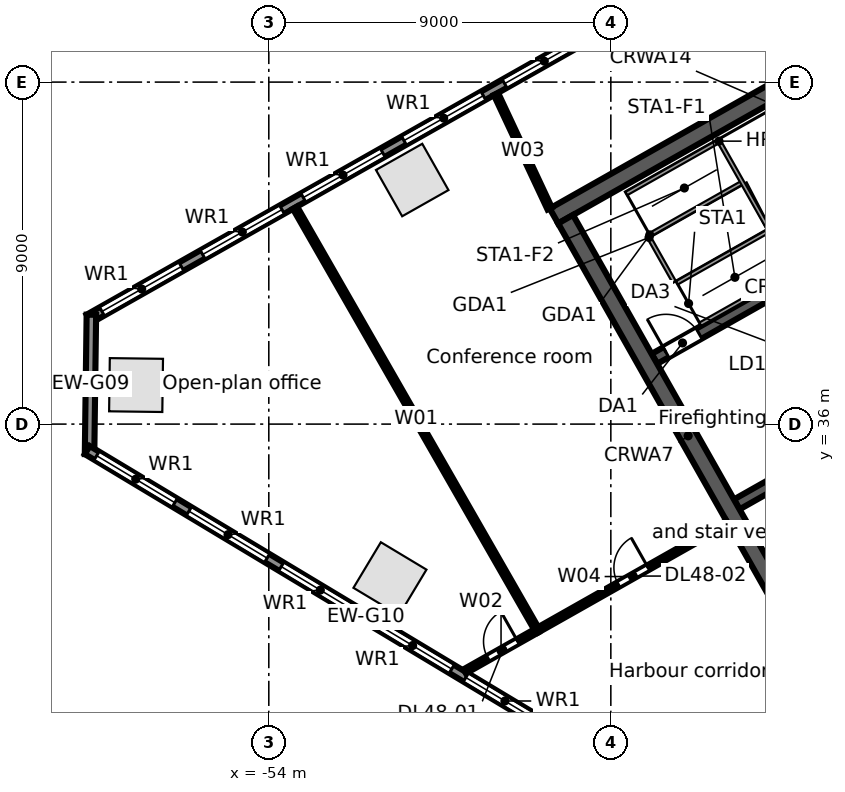
"""IFC4 building model, lengths in metres.
Left out: names, types, materials, properties, quantities, classifications, styles, units other than length and angle.
Written with IfcOpenShell. Run it as: python <this file> out.ifc"""

import sys

from ifc_helpers import new_model, si_unit, direction, frame, frame_2d, origin, origin_2d, place, context, subcontext, project, spatial, rectangle, extrude, element, fill, save


model = new_model("IFC4")
c1 = context("Model", 3, precision=1e-05, world=origin(), true_north=direction((0.0, 1.0)))
c2 = subcontext(c1, "Body", "Model", "MODEL_VIEW")
j1 = project(units=[si_unit("LENGTHUNIT", "METRE"), si_unit("PLANEANGLEUNIT", "RADIAN")], contexts=[c1])
p1 = place(None, origin())
s1 = spatial("IfcSite", under=j1, at=p1, CompositionType="ELEMENT")
p2 = place(p1, origin())
s2 = spatial("IfcBuilding", under=s1, at=p2, CompositionType="ELEMENT")
p3 = place(p2, frame((0.0, 0.0, 219.2)))
s3 = spatial("IfcBuildingStorey", under=s2, at=p3, CompositionType="ELEMENT", Elevation=219.2)
for number, where, z_axis, x_axis in (
    (1, (-50.226, 42.423, 0.0), (0.0, 0.0, 1.0), (-0.87, -0.492, 0.0)),
    (2, (-57.493, 37.027, 0.0), (0.0, 0.0, 1.0), (-0.013, -1.0, 0.0)),
    (3, (-50.812, 31.931, 0.0), (0.0, 0.0, 1.0), (0.857, -0.515, 0.0)),
):
    element("IfcColumn", number, at=place(p3, frame(where, z_axis=z_axis, x_axis=x_axis)), inside=s3, PredefinedType="COLUMN", context=c2, shape_type="SweptSolid", body=[
        extrude(rectangle(XDim=1.4, YDim=1.4, at=origin_2d()), origin(), (0.0, 0.0, 1.0), 3.9),
    ])
p4 = place(p3, frame((-58.732, 38.771, 0.0), z_axis=(0.0, 0.0, 1.0), x_axis=(0.870354824205, 0.492425100887, 0.0)))
e4 = element("IfcWall", 4, at=p4, inside=s3, PredefinedType="STANDARD", context=c2, shape_type="SweptSolid", body=[
    extrude(rectangle(XDim=64.006, YDim=0.25, at=frame_2d((32.003, 0.0))), origin(), (0.0, 0.0, 1.0), 3.62),
])
p5 = place(p4, frame((61.259, 0.0, 0.8)))
e5 = element("IfcOpeningElement", 5, at=p5, cuts=e4, PredefinedType="OPENING", context=c2, shape_type="SweptSolid", body=[
    extrude(rectangle(XDim=2.4, YDim=2.2, at=frame_2d((1.2, 1.1))), frame((0.0, 0.135, 0.0), z_axis=(0.0, -1.0, 0.0), x_axis=(1.0, 0.0, 0.0)), (0.0, 0.0, 1.0), 0.27),
])
p6 = place(p4, frame((58.216, 0.0, 0.8)))
e6 = element("IfcOpeningElement", 6, at=p6, cuts=e4, PredefinedType="OPENING", context=c2, shape_type="SweptSolid", body=[
    extrude(rectangle(XDim=2.4, YDim=2.2, at=frame_2d((1.2, 1.1))), frame((0.0, 0.135, 0.0), z_axis=(0.0, -1.0, 0.0), x_axis=(1.0, 0.0, 0.0)), (0.0, 0.0, 1.0), 0.27),
])
p7 = place(p4, frame((55.173, 0.0, 0.8)))
e7 = element("IfcOpeningElement", 7, at=p7, cuts=e4, PredefinedType="OPENING", context=c2, shape_type="SweptSolid", body=[
    extrude(rectangle(XDim=2.4, YDim=2.2, at=frame_2d((1.2, 1.1))), frame((0.0, 0.135, 0.0), z_axis=(0.0, -1.0, 0.0), x_axis=(1.0, 0.0, 0.0)), (0.0, 0.0, 1.0), 0.27),
])
p8 = place(p4, frame((52.129, 0.0, 0.8)))
e8 = element("IfcOpeningElement", 8, at=p8, cuts=e4, PredefinedType="OPENING", context=c2, shape_type="SweptSolid", body=[
    extrude(rectangle(XDim=2.4, YDim=2.2, at=frame_2d((1.2, 1.1))), frame((0.0, 0.135, 0.0), z_axis=(0.0, -1.0, 0.0), x_axis=(1.0, 0.0, 0.0)), (0.0, 0.0, 1.0), 0.27),
])
p9 = place(p4, frame((49.086, 0.0, 0.8)))
e9 = element("IfcOpeningElement", 9, at=p9, cuts=e4, PredefinedType="OPENING", context=c2, shape_type="SweptSolid", body=[
    extrude(rectangle(XDim=2.4, YDim=2.2, at=frame_2d((1.2, 1.1))), frame((0.0, 0.135, 0.0), z_axis=(0.0, -1.0, 0.0), x_axis=(1.0, 0.0, 0.0)), (0.0, 0.0, 1.0), 0.27),
])
p10 = place(p4, frame((46.043, 0.0, 0.8)))
e10 = element("IfcOpeningElement", 10, at=p10, cuts=e4, PredefinedType="OPENING", context=c2, shape_type="SweptSolid", body=[
    extrude(rectangle(XDim=2.4, YDim=2.2, at=frame_2d((1.2, 1.1))), frame((0.0, 0.135, 0.0), z_axis=(0.0, -1.0, 0.0), x_axis=(1.0, 0.0, 0.0)), (0.0, 0.0, 1.0), 0.27),
])
p11 = place(p4, frame((43.0, 0.0, 0.8)))
e11 = element("IfcOpeningElement", 11, at=p11, cuts=e4, PredefinedType="OPENING", context=c2, shape_type="SweptSolid", body=[
    extrude(rectangle(XDim=2.4, YDim=2.2, at=frame_2d((1.2, 1.1))), frame((0.0, 0.135, 0.0), z_axis=(0.0, -1.0, 0.0), x_axis=(1.0, 0.0, 0.0)), (0.0, 0.0, 1.0), 0.27),
])
p12 = place(p4, frame((39.956, 0.0, 0.8)))
e12 = element("IfcOpeningElement", 12, at=p12, cuts=e4, PredefinedType="OPENING", context=c2, shape_type="SweptSolid", body=[
    extrude(rectangle(XDim=2.4, YDim=2.2, at=frame_2d((1.2, 1.1))), frame((0.0, 0.135, 0.0), z_axis=(0.0, -1.0, 0.0), x_axis=(1.0, 0.0, 0.0)), (0.0, 0.0, 1.0), 0.27),
])
p13 = place(p4, frame((36.913, 0.0, 0.8)))
e13 = element("IfcOpeningElement", 13, at=p13, cuts=e4, PredefinedType="OPENING", context=c2, shape_type="SweptSolid", body=[
    extrude(rectangle(XDim=2.4, YDim=2.2, at=frame_2d((1.2, 1.1))), frame((0.0, 0.135, 0.0), z_axis=(0.0, -1.0, 0.0), x_axis=(1.0, 0.0, 0.0)), (0.0, 0.0, 1.0), 0.27),
])
p14 = place(p4, frame((33.87, 0.0, 0.8)))
e14 = element("IfcOpeningElement", 14, at=p14, cuts=e4, PredefinedType="OPENING", context=c2, shape_type="SweptSolid", body=[
    extrude(rectangle(XDim=2.4, YDim=2.2, at=frame_2d((1.2, 1.1))), frame((0.0, 0.135, 0.0), z_axis=(0.0, -1.0, 0.0), x_axis=(1.0, 0.0, 0.0)), (0.0, 0.0, 1.0), 0.27),
])
p15 = place(p4, frame((30.826, 0.0, 0.8)))
e15 = element("IfcOpeningElement", 15, at=p15, cuts=e4, PredefinedType="OPENING", context=c2, shape_type="SweptSolid", body=[
    extrude(rectangle(XDim=2.4, YDim=2.2, at=frame_2d((1.2, 1.1))), frame((0.0, 0.135, 0.0), z_axis=(0.0, -1.0, 0.0), x_axis=(1.0, 0.0, 0.0)), (0.0, 0.0, 1.0), 0.27),
])
p16 = place(p4, frame((27.783, 0.0, 0.8)))
e16 = element("IfcOpeningElement", 16, at=p16, cuts=e4, PredefinedType="OPENING", context=c2, shape_type="SweptSolid", body=[
    extrude(rectangle(XDim=2.4, YDim=2.2, at=frame_2d((1.2, 1.1))), frame((0.0, 0.135, 0.0), z_axis=(0.0, -1.0, 0.0), x_axis=(1.0, 0.0, 0.0)), (0.0, 0.0, 1.0), 0.27),
])
p17 = place(p4, frame((24.74, 0.0, 0.8)))
e17 = element("IfcOpeningElement", 17, at=p17, cuts=e4, PredefinedType="OPENING", context=c2, shape_type="SweptSolid", body=[
    extrude(rectangle(XDim=2.4, YDim=2.2, at=frame_2d((1.2, 1.1))), frame((0.0, 0.135, 0.0), z_axis=(0.0, -1.0, 0.0), x_axis=(1.0, 0.0, 0.0)), (0.0, 0.0, 1.0), 0.27),
])
p18 = place(p4, frame((21.696, 0.0, 0.8)))
e18 = element("IfcOpeningElement", 18, at=p18, cuts=e4, PredefinedType="OPENING", context=c2, shape_type="SweptSolid", body=[
    extrude(rectangle(XDim=2.4, YDim=2.2, at=frame_2d((1.2, 1.1))), frame((0.0, 0.135, 0.0), z_axis=(0.0, -1.0, 0.0), x_axis=(1.0, 0.0, 0.0)), (0.0, 0.0, 1.0), 0.27),
])
p19 = place(p4, frame((18.653, 0.0, 0.8)))
e19 = element("IfcOpeningElement", 19, at=p19, cuts=e4, PredefinedType="OPENING", context=c2, shape_type="SweptSolid", body=[
    extrude(rectangle(XDim=2.4, YDim=2.2, at=frame_2d((1.2, 1.1))), frame((0.0, 0.135, 0.0), z_axis=(0.0, -1.0, 0.0), x_axis=(1.0, 0.0, 0.0)), (0.0, 0.0, 1.0), 0.27),
])
p20 = place(p4, frame((15.61, 0.0, 0.8)))
e20 = element("IfcOpeningElement", 20, at=p20, cuts=e4, PredefinedType="OPENING", context=c2, shape_type="SweptSolid", body=[
    extrude(rectangle(XDim=2.4, YDim=2.2, at=frame_2d((1.2, 1.1))), frame((0.0, 0.135, 0.0), z_axis=(0.0, -1.0, 0.0), x_axis=(1.0, 0.0, 0.0)), (0.0, 0.0, 1.0), 0.27),
])
p21 = place(p4, frame((12.567, 0.0, 0.8)))
e21 = element("IfcOpeningElement", 21, at=p21, cuts=e4, PredefinedType="OPENING", context=c2, shape_type="SweptSolid", body=[
    extrude(rectangle(XDim=2.4, YDim=2.2, at=frame_2d((1.2, 1.1))), frame((0.0, 0.135, 0.0), z_axis=(0.0, -1.0, 0.0), x_axis=(1.0, 0.0, 0.0)), (0.0, 0.0, 1.0), 0.27),
])
p22 = place(p4, frame((9.523, 0.0, 0.8)))
e22 = element("IfcOpeningElement", 22, at=p22, cuts=e4, PredefinedType="OPENING", context=c2, shape_type="SweptSolid", body=[
    extrude(rectangle(XDim=2.4, YDim=2.2, at=frame_2d((1.2, 1.1))), frame((0.0, 0.135, 0.0), z_axis=(0.0, -1.0, 0.0), x_axis=(1.0, 0.0, 0.0)), (0.0, 0.0, 1.0), 0.27),
])
p23 = place(p4, frame((6.48, 0.0, 0.8)))
e23 = element("IfcOpeningElement", 23, at=p23, cuts=e4, PredefinedType="OPENING", context=c2, shape_type="SweptSolid", body=[
    extrude(rectangle(XDim=2.4, YDim=2.2, at=frame_2d((1.2, 1.1))), frame((0.0, 0.135, 0.0), z_axis=(0.0, -1.0, 0.0), x_axis=(1.0, 0.0, 0.0)), (0.0, 0.0, 1.0), 0.27),
])
p24 = place(p4, frame((3.437, 0.0, 0.8)))
e24 = element("IfcOpeningElement", 24, at=p24, cuts=e4, PredefinedType="OPENING", context=c2, shape_type="SweptSolid", body=[
    extrude(rectangle(XDim=2.4, YDim=2.2, at=frame_2d((1.2, 1.1))), frame((0.0, 0.135, 0.0), z_axis=(0.0, -1.0, 0.0), x_axis=(1.0, 0.0, 0.0)), (0.0, 0.0, 1.0), 0.27),
])
p25 = place(p4, frame((0.393, 0.0, 0.8)))
e25 = element("IfcOpeningElement", 25, at=p25, cuts=e4, PredefinedType="OPENING", context=c2, shape_type="SweptSolid", body=[
    extrude(rectangle(XDim=2.4, YDim=2.2, at=frame_2d((1.2, 1.1))), frame((0.0, 0.135, 0.0), z_axis=(0.0, -1.0, 0.0), x_axis=(1.0, 0.0, 0.0)), (0.0, 0.0, 1.0), 0.27),
])
p26 = place(p3, frame((-58.717, 35.208, 0.0), z_axis=(0.0, 0.0, 1.0), x_axis=(0.01310512158, 0.999914124207, 0.0)))
e26 = element("IfcWall", 26, at=p26, inside=s3, PredefinedType="STANDARD", context=c2, shape_type="SweptSolid", body=[
    extrude(rectangle(XDim=3.67, YDim=0.25, at=frame_2d((1.835, 0.0))), origin(), (0.0, 0.0, 1.0), 3.62),
])
p27 = place(p3, frame((-44.115, 26.507, 0.0), z_axis=(0.0, 0.0, 1.0), x_axis=(-0.857166583633, 0.515039268311, 0.0)))
e27 = element("IfcWall", 27, at=p27, inside=s3, PredefinedType="STANDARD", context=c2, shape_type="SweptSolid", body=[
    extrude(rectangle(XDim=17.106, YDim=0.25, at=frame_2d((8.553, 0.0))), origin(), (0.0, 0.0, 1.0), 3.62),
])
p28 = place(p27, frame((14.417, 0.0, 0.8)))
e28 = element("IfcOpeningElement", 28, at=p28, cuts=e27, PredefinedType="OPENING", context=c2, shape_type="SweptSolid", body=[
    extrude(rectangle(XDim=2.4, YDim=2.2, at=frame_2d((1.2, 1.1))), frame((0.0, 0.135, 0.0), z_axis=(0.0, -1.0, 0.0), x_axis=(1.0, 0.0, 0.0)), (0.0, 0.0, 1.0), 0.27),
])
p29 = place(p27, frame((11.584, 0.0, 0.8)))
e29 = element("IfcOpeningElement", 29, at=p29, cuts=e27, PredefinedType="OPENING", context=c2, shape_type="SweptSolid", body=[
    extrude(rectangle(XDim=2.4, YDim=2.2, at=frame_2d((1.2, 1.1))), frame((0.0, 0.135, 0.0), z_axis=(0.0, -1.0, 0.0), x_axis=(1.0, 0.0, 0.0)), (0.0, 0.0, 1.0), 0.27),
])
p30 = place(p27, frame((8.75, 0.0, 0.8)))
e30 = element("IfcOpeningElement", 30, at=p30, cuts=e27, PredefinedType="OPENING", context=c2, shape_type="SweptSolid", body=[
    extrude(rectangle(XDim=2.4, YDim=2.2, at=frame_2d((1.2, 1.1))), frame((0.0, 0.135, 0.0), z_axis=(0.0, -1.0, 0.0), x_axis=(1.0, 0.0, 0.0)), (0.0, 0.0, 1.0), 0.27),
])
p31 = place(p27, frame((5.917, 0.0, 0.8)))
e31 = element("IfcOpeningElement", 31, at=p31, cuts=e27, PredefinedType="OPENING", context=c2, shape_type="SweptSolid", body=[
    extrude(rectangle(XDim=2.4, YDim=2.2, at=frame_2d((1.2, 1.1))), frame((0.0, 0.135, 0.0), z_axis=(0.0, -1.0, 0.0), x_axis=(1.0, 0.0, 0.0)), (0.0, 0.0, 1.0), 0.27),
])
p32 = place(p27, frame((3.084, 0.0, 0.8)))
e32 = element("IfcOpeningElement", 32, at=p32, cuts=e27, PredefinedType="OPENING", context=c2, shape_type="SweptSolid", body=[
    extrude(rectangle(XDim=2.4, YDim=2.2, at=frame_2d((1.2, 1.1))), frame((0.0, 0.135, 0.0), z_axis=(0.0, -1.0, 0.0), x_axis=(1.0, 0.0, 0.0)), (0.0, 0.0, 1.0), 0.27),
])
p33 = place(p27, frame((0.25, 0.0, 0.8)))
e33 = element("IfcOpeningElement", 33, at=p33, cuts=e27, PredefinedType="OPENING", context=c2, shape_type="SweptSolid", body=[
    extrude(rectangle(XDim=2.4, YDim=2.2, at=frame_2d((1.2, 1.1))), frame((0.0, 0.135, 0.0), z_axis=(0.0, -1.0, 0.0), x_axis=(1.0, 0.0, 0.0)), (0.0, 0.0, 1.0), 0.27),
])
p34 = place(p3, frame((-41.687, 33.887, 0.0), z_axis=(0.0, 0.0, 1.0), x_axis=(0.870355736587, 0.49242348826, 0.0)))
e34 = element("IfcWall", 34, at=p34, inside=s3, PredefinedType="SOLIDWALL", context=c2, shape_type="SweptSolid", body=[
    extrude(rectangle(XDim=6.15, YDim=0.3, at=frame_2d((3.075, 0.0))), origin(), (0.0, 0.0, 1.0), 3.62),
])
p35 = place(p34, frame((1.25, 0.0, 0.0)))
e35 = element("IfcOpeningElement", 35, at=p35, cuts=e34, PredefinedType="OPENING", context=c2, shape_type="SweptSolid", body=[
    extrude(rectangle(XDim=1.1, YDim=2.1, at=frame_2d((0.55, 1.05))), frame((0.0, 0.16, 0.0), z_axis=(0.0, -1.0, 0.0), x_axis=(1.0, 0.0, 0.0)), (0.0, 0.0, 1.0), 0.32),
])
p36 = place(p34, frame((4.4, 0.0, 0.0)))
e36 = element("IfcOpeningElement", 36, at=p36, cuts=e34, PredefinedType="OPENING", context=c2, shape_type="SweptSolid", body=[
    extrude(rectangle(XDim=1.1, YDim=2.1, at=frame_2d((0.55, 1.05))), frame((0.0, 0.16, 0.0), z_axis=(0.0, -1.0, 0.0), x_axis=(1.0, 0.0, 0.0)), (0.0, 0.0, 1.0), 0.32),
])
p37 = place(p3, frame((-43.853, 37.717, 0.0), z_axis=(0.0, 0.0, 1.0), x_axis=(0.870360409231, 0.492415229297, 0.0)))
e37 = element("IfcWall", 37, at=p37, inside=s3, PredefinedType="SOLIDWALL", context=c2, shape_type="SweptSolid", body=[
    extrude(rectangle(XDim=7.55, YDim=0.3, at=frame_2d((3.775, 0.0))), origin(), (0.0, 0.0, 1.0), 3.62),
])
p38 = place(p37, frame((0.35, 0.0, 0.0)))
e38 = element("IfcOpeningElement", 38, at=p38, cuts=e37, PredefinedType="OPENING", context=c2, shape_type="SweptSolid", body=[
    extrude(rectangle(XDim=1.0, YDim=2.1, at=frame_2d((0.5, 1.05))), frame((0.0, 0.16, 0.0), z_axis=(0.0, -1.0, 0.0), x_axis=(1.0, 0.0, 0.0)), (0.0, 0.0, 1.0), 0.32),
])
p39 = place(p3, frame((-46.498, 41.477, 0.0), z_axis=(0.0, 0.0, 1.0), x_axis=(0.870359753402, 0.492416388494, 0.0)))
e39 = element("IfcWall", 39, at=p39, inside=s3, PredefinedType="SOLIDWALL", context=c2, shape_type="SweptSolid", body=[
    extrude(rectangle(XDim=17.0, YDim=0.45, at=frame_2d((8.5, 0.0))), origin(), (0.0, 0.0, 1.0), 3.62),
])
p40 = place(p3, frame((-46.191, 41.392, 0.0), z_axis=(0.0, 0.0, 1.0), x_axis=(0.492421378713, -0.870356930107, 0.0)))
e40 = element("IfcWall", 40, at=p40, inside=s3, PredefinedType="SOLIDWALL", context=c2, shape_type="SweptSolid", body=[
    extrude(rectangle(XDim=13.1, YDim=0.45, at=frame_2d((6.55, 0.0))), origin(), (0.0, 0.0, 1.0), 3.62),
])
p41 = place(p3, frame((-53.311, 41.695, 0.0), z_axis=(0.0, 0.0, 1.0), x_axis=(0.497344363303, -0.867553216979, 0.0)))
e41 = element("IfcWall", 41, at=p41, inside=s3, PredefinedType="PARTITIONING", context=c2, shape_type="SweptSolid", body=[
    extrude(rectangle(XDim=12.82, YDim=0.125, at=frame_2d((6.41, 0.0))), origin(), (0.0, 0.0, 1.0), 2.9),
])
p42 = place(p3, frame((-48.843, 29.494, 0.0), z_axis=(0.0, 0.0, 1.0), x_axis=(0.870427970258, 0.492295793799, 0.0)))
e42 = element("IfcWall", 42, at=p42, inside=s3, PredefinedType="PARTITIONING", context=c2, shape_type="SweptSolid", body=[
    extrude(rectangle(XDim=2.192, YDim=0.125, at=frame_2d((1.096, 0.0))), origin(), (0.0, 0.0, 1.0), 2.9),
])
p43 = place(p42, frame((0.7, 0.0, 0.0)))
e43 = element("IfcOpeningElement", 43, at=p43, cuts=e42, PredefinedType="OPENING", context=c2, shape_type="SweptSolid", body=[
    extrude(rectangle(XDim=0.9, YDim=2.1, at=frame_2d((0.45, 1.05))), frame((0.0, 0.073, 0.0), z_axis=(0.0, -1.0, 0.0), x_axis=(1.0, 0.0, 0.0)), (0.0, 0.0, 1.0), 0.145),
])
p44 = place(p3, frame((-48.022, 44.687, 0.0), z_axis=(0.0, 0.0, 1.0), x_axis=(0.424510917438, -0.905422818895, 0.0)))
e44 = element("IfcWall", 44, at=p44, inside=s3, PredefinedType="PARTITIONING", context=c2, shape_type="SweptSolid", body=[
    extrude(rectangle(XDim=3.329, YDim=0.125, at=frame_2d((1.665, 0.0))), origin(), (0.0, 0.0, 1.0), 2.988),
])
p45 = place(p3, frame((-46.935, 30.573, 0.0), z_axis=(0.0, 0.0, 1.0), x_axis=(0.870367427407, 0.492402824229, 0.0)))
e45 = element("IfcWall", 45, at=p45, inside=s3, PredefinedType="PARTITIONING", context=c2, shape_type="SweptSolid", body=[
    extrude(rectangle(XDim=5.75, YDim=0.125, at=frame_2d((2.875, 0.0))), origin(), (0.0, 0.0, 1.0), 3.62),
])
p46 = place(p45, frame((2.45, 0.0, 0.0)))
e46 = element("IfcOpeningElement", 46, at=p46, cuts=e45, PredefinedType="OPENING", context=c2, shape_type="SweptSolid", body=[
    extrude(rectangle(XDim=0.9, YDim=2.1, at=frame_2d((0.45, 1.05))), frame((0.0, 0.073, 0.0), z_axis=(0.0, -1.0, 0.0), x_axis=(1.0, 0.0, 0.0)), (0.0, 0.0, 1.0), 0.145),
])
p47 = place(p21, origin())
e47 = element("IfcWindow", 47, at=p47, inside=s3, PartitioningType="SINGLE_PANEL", PredefinedType="WINDOW", context=c2, shape_type="SweptSolid", body=[
    extrude(rectangle(XDim=2.4, YDim=2.2, at=frame_2d((1.2, 1.1))), frame((0.0, 0.03, 0.0), z_axis=(0.0, -1.0, 0.0), x_axis=(1.0, 0.0, 0.0)), (0.0, 0.0, 1.0), 0.06),
])
fill(e21, e47)
p48 = place(p22, origin())
e48 = element("IfcWindow", 48, at=p48, inside=s3, PartitioningType="SINGLE_PANEL", PredefinedType="WINDOW", context=c2, shape_type="SweptSolid", body=[
    extrude(rectangle(XDim=2.4, YDim=2.2, at=frame_2d((1.2, 1.1))), frame((0.0, 0.03, 0.0), z_axis=(0.0, -1.0, 0.0), x_axis=(1.0, 0.0, 0.0)), (0.0, 0.0, 1.0), 0.06),
])
fill(e22, e48)
p49 = place(p23, origin())
e49 = element("IfcWindow", 49, at=p49, inside=s3, PartitioningType="SINGLE_PANEL", PredefinedType="WINDOW", context=c2, shape_type="SweptSolid", body=[
    extrude(rectangle(XDim=2.4, YDim=2.2, at=frame_2d((1.2, 1.1))), frame((0.0, 0.03, 0.0), z_axis=(0.0, -1.0, 0.0), x_axis=(1.0, 0.0, 0.0)), (0.0, 0.0, 1.0), 0.06),
])
fill(e23, e49)
p50 = place(p24, origin())
e50 = element("IfcWindow", 50, at=p50, inside=s3, PartitioningType="SINGLE_PANEL", PredefinedType="WINDOW", context=c2, shape_type="SweptSolid", body=[
    extrude(rectangle(XDim=2.4, YDim=2.2, at=frame_2d((1.2, 1.1))), frame((0.0, 0.03, 0.0), z_axis=(0.0, -1.0, 0.0), x_axis=(1.0, 0.0, 0.0)), (0.0, 0.0, 1.0), 0.06),
])
fill(e24, e50)
p51 = place(p25, origin())
e51 = element("IfcWindow", 51, at=p51, inside=s3, PartitioningType="SINGLE_PANEL", PredefinedType="WINDOW", context=c2, shape_type="SweptSolid", body=[
    extrude(rectangle(XDim=2.4, YDim=2.2, at=frame_2d((1.2, 1.1))), frame((0.0, 0.03, 0.0), z_axis=(0.0, -1.0, 0.0), x_axis=(1.0, 0.0, 0.0)), (0.0, 0.0, 1.0), 0.06),
])
fill(e25, e51)
p52 = place(p28, origin())
e52 = element("IfcWindow", 52, at=p52, inside=s3, PartitioningType="SINGLE_PANEL", PredefinedType="WINDOW", context=c2, shape_type="SweptSolid", body=[
    extrude(rectangle(XDim=2.4, YDim=2.2, at=frame_2d((1.2, 1.1))), frame((0.0, 0.03, 0.0), z_axis=(0.0, -1.0, 0.0), x_axis=(1.0, 0.0, 0.0)), (0.0, 0.0, 1.0), 0.06),
])
fill(e28, e52)
p53 = place(p29, origin())
e53 = element("IfcWindow", 53, at=p53, inside=s3, PartitioningType="SINGLE_PANEL", PredefinedType="WINDOW", context=c2, shape_type="SweptSolid", body=[
    extrude(rectangle(XDim=2.4, YDim=2.2, at=frame_2d((1.2, 1.1))), frame((0.0, 0.03, 0.0), z_axis=(0.0, -1.0, 0.0), x_axis=(1.0, 0.0, 0.0)), (0.0, 0.0, 1.0), 0.06),
])
fill(e29, e53)
p54 = place(p30, origin())
e54 = element("IfcWindow", 54, at=p54, inside=s3, PartitioningType="SINGLE_PANEL", PredefinedType="WINDOW", context=c2, shape_type="SweptSolid", body=[
    extrude(rectangle(XDim=2.4, YDim=2.2, at=frame_2d((1.2, 1.1))), frame((0.0, 0.03, 0.0), z_axis=(0.0, -1.0, 0.0), x_axis=(1.0, 0.0, 0.0)), (0.0, 0.0, 1.0), 0.06),
])
fill(e30, e54)
p55 = place(p31, origin())
e55 = element("IfcWindow", 55, at=p55, inside=s3, PartitioningType="SINGLE_PANEL", PredefinedType="WINDOW", context=c2, shape_type="SweptSolid", body=[
    extrude(rectangle(XDim=2.4, YDim=2.2, at=frame_2d((1.2, 1.1))), frame((0.0, 0.03, 0.0), z_axis=(0.0, -1.0, 0.0), x_axis=(1.0, 0.0, 0.0)), (0.0, 0.0, 1.0), 0.06),
])
fill(e31, e55)
p56 = place(p32, origin())
e56 = element("IfcWindow", 56, at=p56, inside=s3, PartitioningType="SINGLE_PANEL", PredefinedType="WINDOW", context=c2, shape_type="SweptSolid", body=[
    extrude(rectangle(XDim=2.4, YDim=2.2, at=frame_2d((1.2, 1.1))), frame((0.0, 0.03, 0.0), z_axis=(0.0, -1.0, 0.0), x_axis=(1.0, 0.0, 0.0)), (0.0, 0.0, 1.0), 0.06),
])
fill(e32, e56)
p57 = place(p38, origin())
e57 = element("IfcDoor", 57, at=p57, inside=s3, OperationType="SINGLE_SWING_LEFT", PredefinedType="DOOR", context=c2, shape_type="SweptSolid", body=[
    extrude(rectangle(XDim=1.0, YDim=2.1, at=frame_2d((0.5, 1.05))), frame((0.0, 0.025, 0.0), z_axis=(0.0, -1.0, 0.0), x_axis=(1.0, 0.0, 0.0)), (0.0, 0.0, 1.0), 0.05),
])
fill(e38, e57)
p58 = place(p43, origin())
e58 = element("IfcDoor", 58, at=p58, inside=s3, OperationType="SINGLE_SWING_RIGHT", PredefinedType="DOOR", context=c2, shape_type="SweptSolid", body=[
    extrude(rectangle(XDim=0.9, YDim=2.1, at=frame_2d((0.45, 1.05))), frame((0.0, 0.025, 0.0), z_axis=(0.0, -1.0, 0.0), x_axis=(1.0, 0.0, 0.0)), (0.0, 0.0, 1.0), 0.05),
])
fill(e43, e58)
p59 = place(p46, origin())
e59 = element("IfcDoor", 59, at=p59, inside=s3, OperationType="SINGLE_SWING_RIGHT", PredefinedType="DOOR", context=c2, shape_type="SweptSolid", body=[
    extrude(rectangle(XDim=0.9, YDim=2.1, at=frame_2d((0.45, 1.05))), frame((0.0, 0.025, 0.0), z_axis=(0.0, -1.0, 0.0), x_axis=(1.0, 0.0, 0.0)), (0.0, 0.0, 1.0), 0.05),
])
fill(e46, e59)
save(model, sys.argv[1])
